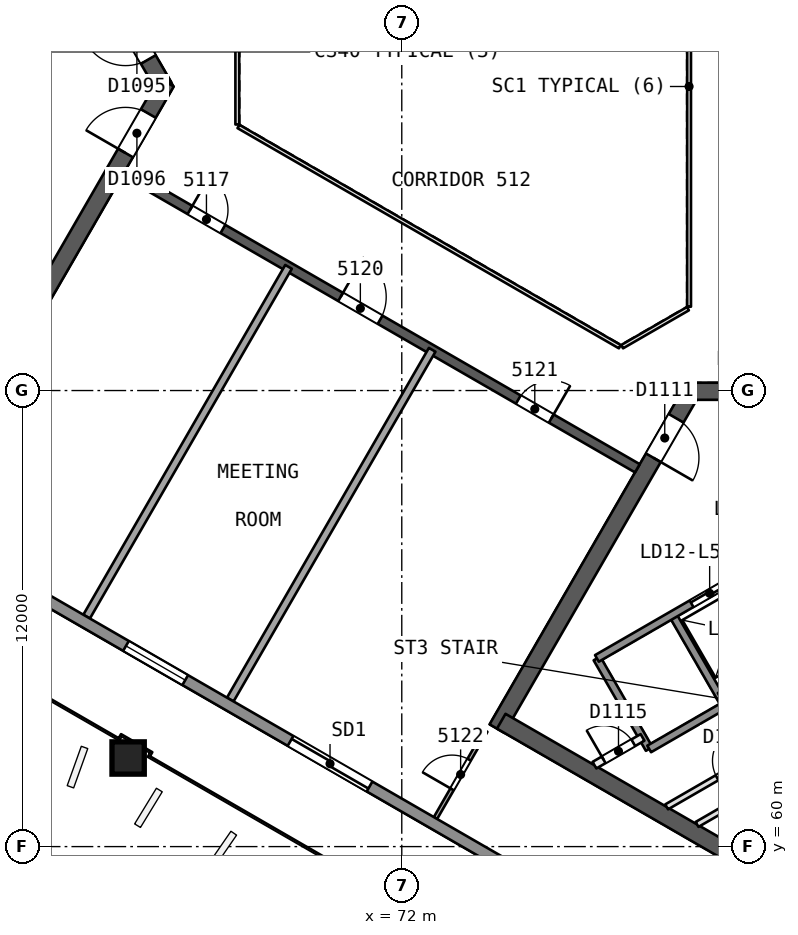
"""IFC4 building model, lengths in metres.
Left out: names, types, materials, properties, quantities, classifications, styles, units other than length and angle.
Written with IfcOpenShell. Run it as: python <this file> out.ifc"""

import sys

from ifc_helpers import new_model, si_unit, direction, frame, frame_2d, origin, origin_2d, place, context, subcontext, project, spatial, rectangle, extrude, element, fill, save


model = new_model("IFC4")
c1 = context("Model", 3, precision=1e-05, world=origin(), true_north=direction((0.0, 1.0)))
c2 = subcontext(c1, "Body", "Model", "MODEL_VIEW")
j1 = project(units=[si_unit("LENGTHUNIT", "METRE"), si_unit("PLANEANGLEUNIT", "RADIAN")], contexts=[c1])
p1 = place(None, origin())
s1 = spatial("IfcSite", under=j1, at=p1, CompositionType="ELEMENT")
p2 = place(p1, origin())
s2 = spatial("IfcBuilding", under=s1, at=p2, CompositionType="ELEMENT")
p3 = place(p2, frame((0.0, 0.0, 209.5)))
s3 = spatial("IfcBuildingStorey", under=s2, at=p3, CompositionType="ELEMENT", Elevation=209.5)
p4 = place(p3, frame((65.74, 80.0, 0.0), z_axis=(0.0, 0.0, 1.0), x_axis=(-0.499991857942, 0.866030104553, 0.0)))
e1 = element("IfcWall", 1, at=p4, inside=s3, PredefinedType="SHEAR", context=c2, shape_type="SweptSolid", body=[
    extrude(rectangle(XDim=10.25, YDim=0.45, at=frame_2d((5.125, 0.0))), origin(), (0.0, 0.0, 1.0), 3.7),
])
p5 = place(p4, frame((0.82, 0.0, 0.0)))
e2 = element("IfcOpeningElement", 2, at=p5, cuts=e1, PredefinedType="OPENING", context=c2, shape_type="SweptSolid", body=[
    extrude(rectangle(XDim=1.2, YDim=2.1, at=frame_2d((0.6, 1.05))), frame((0.0, 0.235, 0.0), z_axis=(0.0, -1.0, 0.0), x_axis=(1.0, 0.0, 0.0)), (0.0, 0.0, 1.0), 0.471),
])
p6 = place(p3, frame((60.728, 71.318, 0.0), z_axis=(0.0, 0.0, 1.0), x_axis=(0.500012416173, 0.866018235185, 0.0)))
e3 = element("IfcWall", 3, at=p6, inside=s3, PredefinedType="SHEAR", context=c2, shape_type="SweptSolid", body=[
    extrude(rectangle(XDim=10.155, YDim=0.45, at=frame_2d((5.078, 0.0))), origin(), (0.0, 0.0, 1.0), 3.7),
])
p7 = place(p6, frame((8.005, 0.0, 0.0)))
e4 = element("IfcOpeningElement", 4, at=p7, cuts=e3, PredefinedType="OPENING", context=c2, shape_type="SweptSolid", body=[
    extrude(rectangle(XDim=1.2, YDim=2.1, at=frame_2d((0.6, 1.05))), frame((0.0, 0.235, 0.0), z_axis=(0.0, -1.0, 0.0), x_axis=(1.0, 0.0, 0.0)), (0.0, 0.0, 1.0), 0.471),
])
p8 = place(p3, frame((79.63, 71.981, 0.0), z_axis=(0.0, 0.0, 1.0), x_axis=(-0.500002171595, -0.86602415001, 0.0)))
e5 = element("IfcWall", 5, at=p8, inside=s3, PredefinedType="SHEAR", context=c2, shape_type="SweptSolid", body=[
    extrude(rectangle(XDim=10.25, YDim=0.45, at=frame_2d((5.125, 0.0))), origin(), (0.0, 0.0, 1.0), 3.7),
])
p9 = place(p8, frame((0.82, 0.0, 0.0)))
e6 = element("IfcOpeningElement", 6, at=p9, cuts=e5, PredefinedType="OPENING", context=c2, shape_type="SweptSolid", body=[
    extrude(rectangle(XDim=1.2, YDim=2.1, at=frame_2d((0.6, 1.05))), frame((0.0, 0.235, 0.0), z_axis=(0.0, -1.0, 0.0), x_axis=(1.0, 0.0, 0.0)), (0.0, 0.0, 1.0), 0.471),
])
p10 = place(p3, frame((74.617, 63.299, 0.0), z_axis=(0.0, 0.0, 1.0), x_axis=(0.86602594008, -0.499999071108, 0.0)))
e7 = element("IfcWall", 7, at=p10, inside=s3, PredefinedType="SHEAR", context=c2, shape_type="SweptSolid", body=[
    extrude(rectangle(XDim=14.108, YDim=0.45, at=frame_2d((7.054, 0.0))), origin(), (0.0, 0.0, 1.0), 3.7),
])
p11 = place(p3, frame((89.655, 71.981, 0.0), z_axis=(0.0, 0.0, 1.0), x_axis=(-1.0, 0.0, 0.0)))
e8 = element("IfcWall", 8, at=p11, inside=s3, PredefinedType="SHEAR", context=c2, shape_type="SweptSolid", body=[
    extrude(rectangle(XDim=10.155, YDim=0.45, at=frame_2d((5.078, 0.0))), origin(), (0.0, 0.0, 1.0), 3.7),
])
p12 = place(p11, frame((8.005, 0.0, 0.0)))
e9 = element("IfcOpeningElement", 9, at=p12, cuts=e8, PredefinedType="OPENING", context=c2, shape_type="SweptSolid", body=[
    extrude(rectangle(XDim=1.2, YDim=2.1, at=frame_2d((0.6, 1.05))), frame((0.0, 0.235, 0.0), z_axis=(0.0, -1.0, 0.0), x_axis=(1.0, 0.0, 0.0)), (0.0, 0.0, 1.0), 0.471),
])
p13 = place(p3, frame((64.7, 77.748, 0.0), z_axis=(0.0, 0.0, 1.0), x_axis=(0.866026492143, -0.499998114903, 0.0)))
e10 = element("IfcWall", 10, at=p13, inside=s3, PredefinedType="SHEAR", context=c2, shape_type="SweptSolid", body=[
    extrude(rectangle(XDim=15.588, YDim=0.25, at=frame_2d((7.794, 0.0))), origin(), (0.0, 0.0, 1.0), 3.3),
])
p14 = place(p13, frame((1.994, 0.0, 0.0)))
e11 = element("IfcOpeningElement", 11, at=p14, cuts=e10, PredefinedType="OPENING", context=c2, shape_type="SweptSolid", body=[
    extrude(rectangle(XDim=1.0, YDim=2.1, at=frame_2d((0.5, 1.05))), frame((0.0, 0.135, 0.0), z_axis=(0.0, -1.0, 0.0), x_axis=(1.0, 0.0, 0.0)), (0.0, 0.0, 1.0), 0.271),
])
p15 = place(p13, frame((6.571, 0.0, 0.0)))
e12 = element("IfcOpeningElement", 12, at=p15, cuts=e10, PredefinedType="OPENING", context=c2, shape_type="SweptSolid", body=[
    extrude(rectangle(XDim=1.2, YDim=2.4, at=frame_2d((0.6, 1.2))), frame((0.0, 0.135, 0.0), z_axis=(0.0, -1.0, 0.0), x_axis=(1.0, 0.0, 0.0)), (0.0, 0.0, 1.0), 0.271),
])
p16 = place(p13, frame((11.971, 0.0, 0.0)))
e13 = element("IfcOpeningElement", 13, at=p16, cuts=e10, PredefinedType="OPENING", context=c2, shape_type="SweptSolid", body=[
    extrude(rectangle(XDim=1.0, YDim=2.1, at=frame_2d((0.5, 1.05))), frame((0.0, 0.135, 0.0), z_axis=(0.0, -1.0, 0.0), x_axis=(1.0, 0.0, 0.0)), (0.0, 0.0, 1.0), 0.271),
])
p17 = place(p3, frame((64.787, 62.311, 0.0), z_axis=(0.010093620709, 0.017482414954, 0.999796221231), x_axis=(-0.866025993948, 0.499998977805, 1.48331e-07)))
e14 = element("IfcColumn", 14, at=p17, inside=s3, PredefinedType="COLUMN", context=c2, shape_type="SweptSolid", body=[
    extrude(rectangle(XDim=0.85, YDim=0.85, at=origin_2d()), origin(), (0.0, 0.0, 1.0), 3.701),
])
for number, where, z_axis, x_axis in (
    (15, (63.707, 66.051, 0.0), (0.0, 0.0, 1.0), (0.5, 0.866, 0.0)),
    (16, (67.487, 63.868, 0.0), (0.0, 0.0, 1.0), (0.5, 0.866, 0.0)),
):
    element("IfcWall", number, at=place(p3, frame(where, z_axis=z_axis, x_axis=x_axis)), inside=s3, PredefinedType="PARTITIONING", context=c2, shape_type="SweptSolid", body=[
        extrude(rectangle(XDim=10.627, YDim=0.2, at=frame_2d((5.313, 0.0))), origin(), (0.0, 0.0, 1.0), 3.3),
    ])
p18 = place(p3, frame((72.886, 60.751, 0.0), z_axis=(0.0, 0.0, 1.0), x_axis=(0.49995654735, 0.86605048973, 0.0)))
e17 = element("IfcWall", 17, at=p18, inside=s3, PredefinedType="PARTITIONING", context=c2, shape_type="SweptSolid", body=[
    extrude(rectangle(XDim=2.648, YDim=0.1, at=frame_2d((1.324, 0.0))), origin(), (0.0, 0.0, 1.0), 3.3),
])
p19 = place(p18, frame((0.874, 0.0, 0.0)))
e18 = element("IfcOpeningElement", 18, at=p19, cuts=e17, PredefinedType="OPENING", context=c2, shape_type="SweptSolid", body=[
    extrude(rectangle(XDim=0.9, YDim=2.1, at=frame_2d((0.45, 1.05))), frame((0.0, 0.061, 0.0), z_axis=(0.0, -1.0, 0.0), x_axis=(1.0, 0.0, 0.0)), (0.0, 0.0, 1.0), 0.121),
])
p20 = place(p3, frame((88.322, 51.667, 0.0), z_axis=(0.0, 0.0, 1.0), x_axis=(-0.866026224187, 0.499998579018, 0.0)))
e19 = element("IfcWall", 19, at=p20, inside=s3, PredefinedType="SOLIDWALL", context=c2, shape_type="SweptSolid", body=[
    extrude(rectangle(XDim=51.406, YDim=0.3, at=frame_2d((25.703, 0.0))), origin(), (0.0, 0.0, 1.0), 3.3),
])
p21 = place(p20, frame((29.803, 0.0, 0.0)))
e20 = element("IfcOpeningElement", 20, at=p21, cuts=e19, PredefinedType="OPENING", context=c2, shape_type="SweptSolid", body=[
    extrude(rectangle(XDim=2.4, YDim=2.4, at=frame_2d((1.2, 1.2))), frame((0.0, 0.161, 0.0), z_axis=(0.0, -1.0, 0.0), x_axis=(1.0, 0.0, 0.0)), (0.0, 0.0, 1.0), 0.321),
])
p22 = place(p20, frame((39.983, 0.0, 0.0)))
e21 = element("IfcOpeningElement", 21, at=p22, cuts=e19, PredefinedType="OPENING", context=c2, shape_type="SweptSolid", body=[
    extrude(rectangle(XDim=2.4, YDim=2.4, at=frame_2d((1.2, 1.2))), frame((0.0, 0.161, 0.0), z_axis=(0.0, -1.0, 0.0), x_axis=(1.0, 0.0, 0.0)), (0.0, 0.0, 1.0), 0.321),
])
p23 = place(p20, frame((19.827, 0.0, 0.0)))
e22 = element("IfcOpeningElement", 22, at=p23, cuts=e19, PredefinedType="OPENING", context=c2, shape_type="SweptSolid", body=[
    extrude(rectangle(XDim=2.4, YDim=2.4, at=frame_2d((1.2, 1.2))), frame((0.0, 0.161, 0.0), z_axis=(0.0, -1.0, 0.0), x_axis=(1.0, 0.0, 0.0)), (0.0, 0.0, 1.0), 0.321),
])
p24 = place(p20, frame((9.0, 0.0, 0.0)))
e23 = element("IfcOpeningElement", 23, at=p24, cuts=e19, PredefinedType="OPENING", context=c2, shape_type="SweptSolid", body=[
    extrude(rectangle(XDim=2.4, YDim=2.4, at=frame_2d((1.2, 1.2))), frame((0.0, 0.161, 0.0), z_axis=(0.0, -1.0, 0.0), x_axis=(1.0, 0.0, 0.0)), (0.0, 0.0, 1.0), 0.321),
])
p25 = place(p20, frame((25.427, 0.0, 0.9)))
e24 = element("IfcOpeningElement", 24, at=p25, cuts=e19, PredefinedType="OPENING", context=c2, shape_type="SweptSolid", body=[
    extrude(rectangle(XDim=1.8, YDim=1.5, at=frame_2d((0.9, 0.75))), frame((0.0, 0.161, 0.0), z_axis=(0.0, -1.0, 0.0), x_axis=(1.0, 0.0, 0.0)), (0.0, 0.0, 1.0), 0.321),
])
for number, where, z_axis, x_axis in (
    (25, (77.135, 64.952, 0.0), (0.0, 0.0, 1.0), (0.5, -0.866, 0.0)),
    (26, (79.127, 66.102, 0.0), (0.0, 0.0, 1.0), (0.5, -0.866, 0.0)),
):
    element("IfcWall", number, at=place(p3, frame(where, z_axis=z_axis, x_axis=x_axis)), inside=s3, PredefinedType="SOLIDWALL", context=c2, shape_type="SweptSolid", body=[
        extrude(rectangle(XDim=2.75, YDim=0.2, at=frame_2d((1.375, 0.0))), origin(), (0.0, 0.0, 1.0), 3.3),
    ])
p26 = place(p3, frame((77.135, 64.952, 0.0), z_axis=(0.0, 0.0, 1.0), x_axis=(0.866031916153, 0.499988720078, 0.0)))
e27 = element("IfcWall", 27, at=p26, inside=s3, PredefinedType="SOLIDWALL", context=c2, shape_type="SweptSolid", body=[
    extrude(rectangle(XDim=11.35, YDim=0.2, at=frame_2d((5.675, 0.0))), origin(), (0.0, 0.0, 1.0), 3.3),
])
p27 = place(p26, frame((2.875, 0.0, 0.0)))
e28 = element("IfcOpeningElement", 28, at=p27, cuts=e27, PredefinedType="OPENING", context=c2, shape_type="SweptSolid", body=[
    extrude(rectangle(XDim=1.1, YDim=2.1, at=frame_2d((0.55, 1.05))), frame((0.0, 0.11, 0.0), z_axis=(0.0, -1.0, 0.0), x_axis=(1.0, 0.0, 0.0)), (0.0, 0.0, 1.0), 0.221),
])
p28 = place(p26, frame((5.125, 0.0, 0.0)))
e29 = element("IfcOpeningElement", 29, at=p28, cuts=e27, PredefinedType="OPENING", context=c2, shape_type="SweptSolid", body=[
    extrude(rectangle(XDim=1.1, YDim=2.1, at=frame_2d((0.55, 1.05))), frame((0.0, 0.11, 0.0), z_axis=(0.0, -1.0, 0.0), x_axis=(1.0, 0.0, 0.0)), (0.0, 0.0, 1.0), 0.221),
])
p29 = place(p26, frame((7.375, 0.0, 0.0)))
e30 = element("IfcOpeningElement", 30, at=p29, cuts=e27, PredefinedType="OPENING", context=c2, shape_type="SweptSolid", body=[
    extrude(rectangle(XDim=1.1, YDim=2.1, at=frame_2d((0.55, 1.05))), frame((0.0, 0.11, 0.0), z_axis=(0.0, -1.0, 0.0), x_axis=(1.0, 0.0, 0.0)), (0.0, 0.0, 1.0), 0.221),
])
p30 = place(p3, frame((77.07, 62.143, 0.0), z_axis=(0.0, 0.0, 1.0), x_axis=(0.866013036001, 0.500021421018, 0.0)))
e31 = element("IfcWall", 31, at=p30, inside=s3, PredefinedType="PARTITIONING", context=c2, shape_type="SweptSolid", body=[
    extrude(rectangle(XDim=1.461, YDim=0.2, at=frame_2d((0.73, 0.0))), origin(), (0.0, 0.0, 1.0), 3.3),
])
p31 = place(p30, frame((0.281, 0.0, 0.0)))
e32 = element("IfcOpeningElement", 32, at=p31, cuts=e31, PredefinedType="OPENING", context=c2, shape_type="SweptSolid", body=[
    extrude(rectangle(XDim=0.9, YDim=2.1, at=frame_2d((0.45, 1.05))), frame((0.0, 0.11, 0.0), z_axis=(0.0, -1.0, 0.0), x_axis=(1.0, 0.0, 0.0)), (0.0, 0.0, 1.0), 0.221),
])
p32 = place(p3, frame((80.367, 63.954, 0.0), z_axis=(0.0, 0.0, 1.0), x_axis=(0.866026575979, 0.499997969693, 0.0)))
e33 = element("IfcWall", 33, at=p32, inside=s3, PredefinedType="SOLIDWALL", context=c2, shape_type="SweptSolid", body=[
    extrude(rectangle(XDim=6.75, YDim=0.2, at=frame_2d((3.375, 0.0))), origin(), (0.0, 0.0, 1.0), 3.3),
])
p33 = place(p3, frame((78.51, 62.57, 0.0), z_axis=(0.0, 0.0, 1.0), x_axis=(0.866053019151, 0.499952165731, 0.0)))
e34 = element("IfcWall", 34, at=p33, inside=s3, PredefinedType="SOLIDWALL", context=c2, shape_type="SweptSolid", body=[
    extrude(rectangle(XDim=2.3, YDim=0.2, at=frame_2d((1.15, 0.0))), origin(), (0.0, 0.0, 1.0), 3.3),
])
p34 = place(p3, frame((78.97, 61.046, 0.0), z_axis=(0.0, 0.0, 1.0), x_axis=(0.866044057189, 0.499967689963, 0.0)))
e35 = element("IfcWall", 35, at=p34, inside=s3, PredefinedType="PARTITIONING", context=c2, shape_type="SweptSolid", body=[
    extrude(rectangle(XDim=3.964, YDim=0.15, at=frame_2d((1.982, 0.0))), origin(), (0.0, 0.0, 1.0), 3.3),
])
p35 = place(p34, frame((1.532, 0.0, 0.0)))
e36 = element("IfcOpeningElement", 36, at=p35, cuts=e35, PredefinedType="OPENING", context=c2, shape_type="SweptSolid", body=[
    extrude(rectangle(XDim=0.9, YDim=2.1, at=frame_2d((0.45, 1.05))), frame((0.0, 0.085, 0.0), z_axis=(0.0, -1.0, 0.0), x_axis=(1.0, 0.0, 0.0)), (0.0, 0.0, 1.0), 0.171),
])
p36 = place(p3, frame((79.77, 60.584, 0.0), z_axis=(0.0, 0.0, 1.0), x_axis=(0.866021168401, 0.500007335828, 0.0)))
e37 = element("IfcWall", 37, at=p36, inside=s3, PredefinedType="PARTITIONING", context=c2, shape_type="SweptSolid", body=[
    extrude(rectangle(XDim=2.077, YDim=0.15, at=frame_2d((1.039, 0.0))), origin(), (0.0, 0.0, 1.0), 3.3),
])
p37 = place(p3, frame((79.56, 74.206, 0.0), z_axis=(0.0, 0.0, 1.0), x_axis=(0.0, 1.0, 0.0)))
e38 = element("IfcWall", 38, at=p37, inside=s3, PredefinedType="PARTITIONING", context=c2, shape_type="SweptSolid", body=[
    extrude(rectangle(XDim=11.588, YDim=0.1, at=frame_2d((5.794, 0.0))), origin(), (0.0, 0.0, 1.0), 3.3),
])
p38 = place(p3, frame((67.672, 81.0, 0.0), z_axis=(0.0, 0.0, 1.0), x_axis=(0.0, -1.0, 0.0)))
e39 = element("IfcWall", 39, at=p38, inside=s3, PredefinedType="PARTITIONING", context=c2, shape_type="SweptSolid", body=[
    extrude(rectangle(XDim=2.0, YDim=0.1, at=frame_2d((1.0, 0.0))), origin(), (0.0, 0.0, 1.0), 3.3),
])
p39 = place(p3, frame((67.702, 78.948, 0.0), z_axis=(0.0, 0.0, 1.0), x_axis=(0.866026658274, -0.499997827154, 0.0)))
e40 = element("IfcWall", 40, at=p39, inside=s3, PredefinedType="PARTITIONING", context=c2, shape_type="SweptSolid", body=[
    extrude(rectangle(XDim=11.588, YDim=0.1, at=frame_2d((5.794, 0.0))), origin(), (0.0, 0.0, 1.0), 3.3),
])
p40 = place(p3, frame((77.798, 73.154, 0.0), z_axis=(0.0, 0.0, 1.0), x_axis=(0.866041268327, 0.499972520799, 0.0)))
e41 = element("IfcWall", 41, at=p40, inside=s3, PredefinedType="PARTITIONING", context=c2, shape_type="SweptSolid", body=[
    extrude(rectangle(XDim=2.0, YDim=0.1, at=frame_2d((1.0, 0.0))), origin(), (0.0, 0.0, 1.0), 3.3),
])
p41 = place(p14, origin())
e42 = element("IfcDoor", 42, at=p41, inside=s3, OperationType="SINGLE_SWING_LEFT", PredefinedType="NOTDEFINED", context=c2, shape_type="SweptSolid", body=[
    extrude(rectangle(XDim=1.0, YDim=2.1, at=frame_2d((0.5, 1.05))), frame((0.0, 0.025, 0.0), z_axis=(0.0, -1.0, 0.0), x_axis=(1.0, 0.0, 0.0)), (0.0, 0.0, 1.0), 0.05),
])
fill(e11, e42)
p42 = place(p15, origin())
e43 = element("IfcDoor", 43, at=p42, inside=s3, OperationType="SINGLE_SWING_LEFT", PredefinedType="NOTDEFINED", context=c2, shape_type="SweptSolid", body=[
    extrude(rectangle(XDim=1.2, YDim=2.4, at=frame_2d((0.6, 1.2))), frame((0.0, 0.025, 0.0), z_axis=(0.0, -1.0, 0.0), x_axis=(1.0, 0.0, 0.0)), (0.0, 0.0, 1.0), 0.05),
])
fill(e12, e43)
p43 = place(p16, origin())
e44 = element("IfcDoor", 44, at=p43, inside=s3, OperationType="SINGLE_SWING_RIGHT", PredefinedType="NOTDEFINED", context=c2, shape_type="SweptSolid", body=[
    extrude(rectangle(XDim=1.0, YDim=2.1, at=frame_2d((0.5, 1.05))), frame((0.0, 0.025, 0.0), z_axis=(0.0, -1.0, 0.0), x_axis=(1.0, 0.0, 0.0)), (0.0, 0.0, 1.0), 0.05),
])
fill(e13, e44)
p44 = place(p19, origin())
e45 = element("IfcDoor", 45, at=p44, inside=s3, OperationType="SINGLE_SWING_LEFT", PredefinedType="NOTDEFINED", context=c2, shape_type="SweptSolid", body=[
    extrude(rectangle(XDim=0.9, YDim=2.1, at=frame_2d((0.45, 1.05))), frame((0.0, 0.025, 0.0), z_axis=(0.0, -1.0, 0.0), x_axis=(1.0, 0.0, 0.0)), (0.0, 0.0, 1.0), 0.05),
])
fill(e18, e45)
p45 = place(p23, origin())
e46 = element("IfcDoor", 46, at=p45, inside=s3, OperationType="SLIDING_TO_LEFT", PredefinedType="NOTDEFINED", context=c2, shape_type="SweptSolid", body=[
    extrude(rectangle(XDim=2.4, YDim=2.4, at=frame_2d((1.2, 1.2))), frame((0.0, 0.025, 0.0), z_axis=(0.0, -1.0, 0.0), x_axis=(1.0, 0.0, 0.0)), (0.0, 0.0, 1.0), 0.05),
])
fill(e22, e46)
p46 = place(p25, origin())
e47 = element("IfcWindow", 47, at=p46, inside=s3, PartitioningType="SINGLE_PANEL", PredefinedType="WINDOW", context=c2, shape_type="SweptSolid", body=[
    extrude(rectangle(XDim=1.8, YDim=1.5, at=frame_2d((0.9, 0.75))), frame((0.0, 0.03, 0.0), z_axis=(0.0, -1.0, 0.0), x_axis=(1.0, 0.0, 0.0)), (0.0, 0.0, 1.0), 0.06),
])
fill(e24, e47)
p47 = place(p5, origin())
e48 = element("IfcDoor", 48, at=p47, inside=s3, OperationType="SINGLE_SWING_RIGHT", PredefinedType="NOTDEFINED", context=c2, shape_type="SweptSolid", body=[
    extrude(rectangle(XDim=1.2, YDim=2.1, at=frame_2d((0.6, 1.05))), frame((0.0, 0.025, 0.0), z_axis=(0.0, -1.0, 0.0), x_axis=(1.0, 0.0, 0.0)), (0.0, 0.0, 1.0), 0.05),
])
fill(e2, e48)
p48 = place(p7, origin())
e49 = element("IfcDoor", 49, at=p48, inside=s3, OperationType="SINGLE_SWING_LEFT", PredefinedType="NOTDEFINED", context=c2, shape_type="SweptSolid", body=[
    extrude(rectangle(XDim=1.2, YDim=2.1, at=frame_2d((0.6, 1.05))), frame((0.0, 0.025, 0.0), z_axis=(0.0, -1.0, 0.0), x_axis=(1.0, 0.0, 0.0)), (0.0, 0.0, 1.0), 0.05),
])
fill(e4, e49)
p49 = place(p9, origin())
e50 = element("IfcDoor", 50, at=p49, inside=s3, OperationType="SINGLE_SWING_RIGHT", PredefinedType="NOTDEFINED", context=c2, shape_type="SweptSolid", body=[
    extrude(rectangle(XDim=1.2, YDim=2.1, at=frame_2d((0.6, 1.05))), frame((0.0, 0.025, 0.0), z_axis=(0.0, -1.0, 0.0), x_axis=(1.0, 0.0, 0.0)), (0.0, 0.0, 1.0), 0.05),
])
fill(e6, e50)
p50 = place(p27, origin())
e51 = element("IfcDoor", 51, at=p50, inside=s3, OperationType="SLIDING_TO_LEFT", PredefinedType="NOTDEFINED", context=c2, shape_type="SweptSolid", body=[
    extrude(rectangle(XDim=1.1, YDim=2.1, at=frame_2d((0.55, 1.05))), frame((0.0, 0.025, 0.0), z_axis=(0.0, -1.0, 0.0), x_axis=(1.0, 0.0, 0.0)), (0.0, 0.0, 1.0), 0.05),
])
fill(e28, e51)
p51 = place(p35, origin())
e52 = element("IfcDoor", 52, at=p51, inside=s3, OperationType="SINGLE_SWING_RIGHT", PredefinedType="NOTDEFINED", context=c2, shape_type="SweptSolid", body=[
    extrude(rectangle(XDim=0.9, YDim=2.1, at=frame_2d((0.45, 1.05))), frame((0.0, 0.025, 0.0), z_axis=(0.0, -1.0, 0.0), x_axis=(1.0, 0.0, 0.0)), (0.0, 0.0, 1.0), 0.05),
])
fill(e36, e52)
p52 = place(p31, origin())
e53 = element("IfcDoor", 53, at=p52, inside=s3, OperationType="SINGLE_SWING_LEFT", PredefinedType="NOTDEFINED", context=c2, shape_type="SweptSolid", body=[
    extrude(rectangle(XDim=0.9, YDim=2.1, at=frame_2d((0.45, 1.05))), frame((0.0, 0.025, 0.0), z_axis=(0.0, -1.0, 0.0), x_axis=(1.0, 0.0, 0.0)), (0.0, 0.0, 1.0), 0.05),
])
fill(e32, e53)
save(model, sys.argv[1])
